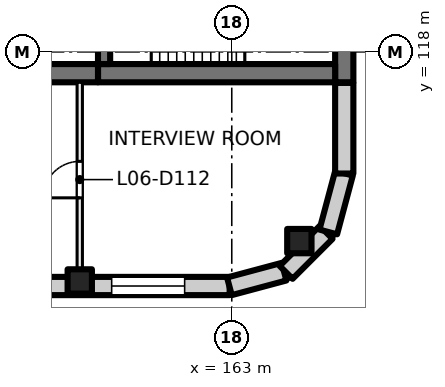
"""IFC4 building model, lengths in metres.
Left out: names, types, materials, properties, quantities, classifications, styles, units other than length and angle.
Written with IfcOpenShell. Run it as: python <this file> out.ifc"""

import sys

from ifc_helpers import new_model, si_unit, direction, frame, frame_2d, origin, origin_2d, place, context, subcontext, project, spatial, rectangle, extrude, element, fill, save


model = new_model("IFC4")
c1 = context("Model", 3, precision=1e-05, world=origin(), true_north=direction((0.0, 1.0)))
c2 = subcontext(c1, "Body", "Model", "MODEL_VIEW")
j1 = project(units=[si_unit("LENGTHUNIT", "METRE"), si_unit("PLANEANGLEUNIT", "RADIAN")], contexts=[c1])
p1 = place(None, origin())
s1 = spatial("IfcSite", under=j1, at=p1, CompositionType="ELEMENT")
p2 = place(p1, origin())
s2 = spatial("IfcBuilding", under=s1, at=p2, CompositionType="ELEMENT")
p3 = place(p2, frame((0.0, 0.0, 31.5)))
s3 = spatial("IfcBuildingStorey", under=s2, at=p3, CompositionType="ELEMENT", Elevation=31.5)
for number, where, z_axis, x_axis in (
    (1, (165.223, 111.777, 0.0), (0.0, 0.0, 1.0), (1.0, 0.0, 0.0)),
    (2, (158.0, 110.45, 0.0), (0.0, 0.0, 1.0), (1.0, 0.0, 0.0)),
):
    element("IfcColumn", number, at=place(p3, frame(where, z_axis=z_axis, x_axis=x_axis)), inside=s3, PredefinedType="COLUMN", context=c2, shape_type="SweptSolid", body=[
        extrude(rectangle(XDim=0.8, YDim=0.8, at=origin_2d()), origin(), (0.0, 0.0, 1.0), 4.0),
    ])
p4 = place(p3, frame((166.7, 120.8, 0.0), z_axis=(0.0, 0.0, 1.0), x_axis=(0.0, -1.0, 0.0)))
e3 = element("IfcWall", 3, at=p4, inside=s3, PredefinedType="SHEAR", context=c2, shape_type="SweptSolid", body=[
    extrude(rectangle(XDim=3.8, YDim=0.6, at=frame_2d((1.9, 0.0))), origin(), (0.0, 0.0, 1.0), 4.0),
])
p5 = place(p3, frame((166.4, 117.3, 0.0), z_axis=(0.0, 0.0, 1.0), x_axis=(-1.0, 0.0, 0.0)))
e4 = element("IfcWall", 4, at=p5, inside=s3, PredefinedType="SHEAR", context=c2, shape_type="SweptSolid", body=[
    extrude(rectangle(XDim=7.8, YDim=0.6, at=frame_2d((3.9, 0.0))), origin(), (0.0, 0.0, 1.0), 4.0),
])
p6 = place(p3, frame((158.6, 117.3, 0.0), z_axis=(0.0, 0.0, 1.0), x_axis=(-1.0, 0.0, 0.0)))
e5 = element("IfcWall", 5, at=p6, inside=s3, PredefinedType="SHEAR", context=c2, shape_type="SweptSolid", body=[
    extrude(rectangle(XDim=4.6, YDim=0.6, at=frame_2d((2.3, 0.0))), origin(), (0.0, 0.0, 1.0), 4.0),
])
p7 = place(p3, frame((158.8, 120.4, 0.0), z_axis=(0.0, 0.0, 1.0), x_axis=(0.0, -1.0, 0.0)))
e6 = element("IfcWall", 6, at=p7, inside=s3, PredefinedType="SHEAR", context=c2, shape_type="SweptSolid", body=[
    extrude(rectangle(XDim=2.8, YDim=0.4, at=frame_2d((1.4, 0.0))), origin(), (0.0, 0.0, 1.0), 4.0),
])
p8 = place(p7, frame((0.9, 0.0, 0.0)))
e7 = element("IfcOpeningElement", 7, at=p8, cuts=e6, PredefinedType="OPENING", context=c2, shape_type="SweptSolid", body=[
    extrude(rectangle(XDim=1.0, YDim=2.1, at=frame_2d((0.5, 1.05))), frame((0.0, 0.21, 0.0), z_axis=(0.0, -1.0, 0.0), x_axis=(1.0, 0.0, 0.0)), (0.0, 0.0, 1.0), 0.42),
])
p9 = place(p3, frame((162.93, 110.3, 0.0), z_axis=(0.0, 0.0, 1.0), x_axis=(-1.0, 0.0, 0.0)))
e8 = element("IfcWall", 8, at=p9, inside=s3, PredefinedType="SOLIDWALL", context=c2, shape_type="SweptSolid", body=[
    extrude(rectangle(XDim=31.93, YDim=0.6, at=frame_2d((15.965, 0.0))), origin(), (0.0, 0.0, 1.0), 3.625),
])
p10 = place(p9, frame((1.48, 0.0, 0.9)))
e9 = element("IfcOpeningElement", 9, at=p10, cuts=e8, PredefinedType="OPENING", context=c2, shape_type="SweptSolid", body=[
    extrude(rectangle(XDim=2.4, YDim=2.4, at=frame_2d((1.2, 1.2))), frame((0.0, 0.31, 0.0), z_axis=(0.0, -1.0, 0.0), x_axis=(1.0, 0.0, 0.0)), (0.0, 0.0, 1.0), 0.62),
])
p11 = place(p9, frame((5.98, 0.0, 0.9)))
e10 = element("IfcOpeningElement", 10, at=p11, cuts=e8, PredefinedType="OPENING", context=c2, shape_type="SweptSolid", body=[
    extrude(rectangle(XDim=2.4, YDim=2.4, at=frame_2d((1.2, 1.2))), frame((0.0, 0.31, 0.0), z_axis=(0.0, -1.0, 0.0), x_axis=(1.0, 0.0, 0.0)), (0.0, 0.0, 1.0), 0.62),
])
p12 = place(p9, frame((10.48, 0.0, 0.9)))
e11 = element("IfcOpeningElement", 11, at=p12, cuts=e8, PredefinedType="OPENING", context=c2, shape_type="SweptSolid", body=[
    extrude(rectangle(XDim=2.4, YDim=2.4, at=frame_2d((1.2, 1.2))), frame((0.0, 0.31, 0.0), z_axis=(0.0, -1.0, 0.0), x_axis=(1.0, 0.0, 0.0)), (0.0, 0.0, 1.0), 0.62),
])
p13 = place(p9, frame((14.98, 0.0, 0.9)))
e12 = element("IfcOpeningElement", 12, at=p13, cuts=e8, PredefinedType="OPENING", context=c2, shape_type="SweptSolid", body=[
    extrude(rectangle(XDim=2.4, YDim=2.4, at=frame_2d((1.2, 1.2))), frame((0.0, 0.31, 0.0), z_axis=(0.0, -1.0, 0.0), x_axis=(1.0, 0.0, 0.0)), (0.0, 0.0, 1.0), 0.62),
])
p14 = place(p9, frame((19.48, 0.0, 0.9)))
e13 = element("IfcOpeningElement", 13, at=p14, cuts=e8, PredefinedType="OPENING", context=c2, shape_type="SweptSolid", body=[
    extrude(rectangle(XDim=2.4, YDim=2.4, at=frame_2d((1.2, 1.2))), frame((0.0, 0.31, 0.0), z_axis=(0.0, -1.0, 0.0), x_axis=(1.0, 0.0, 0.0)), (0.0, 0.0, 1.0), 0.62),
])
p15 = place(p9, frame((23.98, 0.0, 0.9)))
e14 = element("IfcOpeningElement", 14, at=p15, cuts=e8, PredefinedType="OPENING", context=c2, shape_type="SweptSolid", body=[
    extrude(rectangle(XDim=2.4, YDim=2.4, at=frame_2d((1.2, 1.2))), frame((0.0, 0.31, 0.0), z_axis=(0.0, -1.0, 0.0), x_axis=(1.0, 0.0, 0.0)), (0.0, 0.0, 1.0), 0.62),
])
p16 = place(p9, frame((28.48, 0.0, 0.9)))
e15 = element("IfcOpeningElement", 15, at=p16, cuts=e8, PredefinedType="OPENING", context=c2, shape_type="SweptSolid", body=[
    extrude(rectangle(XDim=2.4, YDim=2.4, at=frame_2d((1.2, 1.2))), frame((0.0, 0.31, 0.0), z_axis=(0.0, -1.0, 0.0), x_axis=(1.0, 0.0, 0.0)), (0.0, 0.0, 1.0), 0.62),
])
for number, where, z_axis, x_axis in (
    (16, (164.719, 110.771, 0.0), (0.0, 0.0, 1.0), (-0.966, -0.259, 0.0)),
    (17, (166.104, 112.064, 0.0), (0.0, 0.0, 1.0), (-0.707, -0.707, 0.0)),
):
    element("IfcWall", number, at=place(p3, frame(where, z_axis=z_axis, x_axis=x_axis)), inside=s3, PredefinedType="SOLIDWALL", context=c2, shape_type="SweptSolid", body=[
        extrude(rectangle(XDim=1.861, YDim=0.6, at=frame_2d((0.93, 0.0))), origin(), (0.0, 0.0, 1.0), 3.625),
    ])
p17 = place(p3, frame((166.692, 114.01, 0.0), z_axis=(0.0, 0.0, 1.0), x_axis=(-0.258839784042, -0.965920269068, 0.0)))
e18 = element("IfcWall", 18, at=p17, inside=s3, PredefinedType="SOLIDWALL", context=c2, shape_type="SweptSolid", body=[
    extrude(rectangle(XDim=2.0, YDim=0.6, at=frame_2d((1.0, 0.0))), origin(), (0.0, 0.0, 1.0), 3.625),
])
p18 = place(p3, frame((166.7, 116.98, 0.0), z_axis=(0.0, 0.0, 1.0), x_axis=(0.0, -1.0, 0.0)))
e19 = element("IfcWall", 19, at=p18, inside=s3, PredefinedType="SOLIDWALL", context=c2, shape_type="SweptSolid", body=[
    extrude(rectangle(XDim=2.98, YDim=0.6, at=frame_2d((1.49, 0.0))), origin(), (0.0, 0.0, 1.0), 3.625),
])
p19 = place(p3, frame((158.0, 110.6, 0.0), z_axis=(0.0, 0.0, 1.0), x_axis=(0.0, 1.0, 0.0)))
e20 = element("IfcWall", 20, at=p19, inside=s3, PredefinedType="PARTITIONING", context=c2, shape_type="SweptSolid", body=[
    extrude(rectangle(XDim=6.4, YDim=0.175, at=frame_2d((3.2, 0.0))), origin(), (0.0, 0.0, 1.0), 3.625),
])
p20 = place(p19, frame((2.6, 0.0, 0.0)))
e21 = element("IfcOpeningElement", 21, at=p20, cuts=e20, PredefinedType="OPENING", context=c2, shape_type="SweptSolid", body=[
    extrude(rectangle(XDim=1.2, YDim=2.1, at=frame_2d((0.6, 1.05))), frame((0.0, 0.097, 0.0), z_axis=(0.0, -1.0, 0.0), x_axis=(1.0, 0.0, 0.0)), (0.0, 0.0, 1.0), 0.195),
])
p21 = place(p10, origin())
e22 = element("IfcWindow", 22, at=p21, inside=s3, PartitioningType="SINGLE_PANEL", PredefinedType="WINDOW", context=c2, shape_type="SweptSolid", body=[
    extrude(rectangle(XDim=2.4, YDim=2.4, at=frame_2d((1.2, 1.2))), frame((0.0, 0.03, 0.0), z_axis=(0.0, -1.0, 0.0), x_axis=(1.0, 0.0, 0.0)), (0.0, 0.0, 1.0), 0.06),
])
fill(e9, e22)
p22 = place(p20, origin())
e23 = element("IfcDoor", 23, at=p22, inside=s3, OperationType="DOUBLE_DOOR_SINGLE_SWING", PredefinedType="DOOR", context=c2, shape_type="SweptSolid", body=[
    extrude(rectangle(XDim=1.2, YDim=2.1, at=frame_2d((0.6, 1.05))), frame((0.0, 0.025, 0.0), z_axis=(0.0, -1.0, 0.0), x_axis=(1.0, 0.0, 0.0)), (0.0, 0.0, 1.0), 0.05),
])
fill(e21, e23)
save(model, sys.argv[1])
